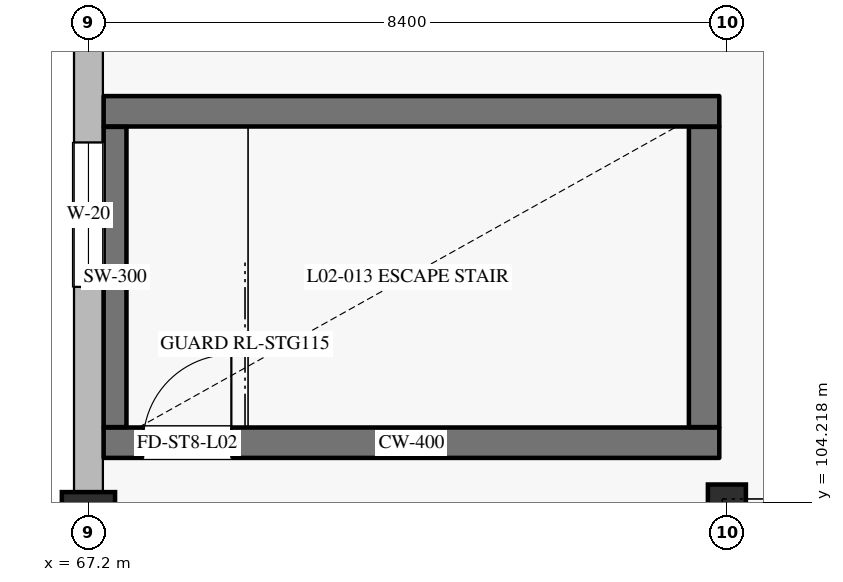
"""IFC4 building model, lengths in metres.
Left out: names, types, materials, properties, quantities, classifications, styles, units other than length and angle.
Written with IfcOpenShell. Run it as: python <this file> out.ifc"""

import sys

from ifc_helpers import new_model, si_unit, direction, frame, frame_2d, origin, origin_2d, place, context, subcontext, project, spatial, rectangle, hollow_rectangle, extrude, element, fill, save


model = new_model("IFC4")
c1 = context("Model", 3, precision=1e-05, world=origin(), true_north=direction((0.0, 1.0)))
c2 = subcontext(c1, "Body", "Model", "MODEL_VIEW")
j1 = project(units=[si_unit("LENGTHUNIT", "METRE"), si_unit("PLANEANGLEUNIT", "RADIAN")], contexts=[c1])
p1 = place(None, origin())
s1 = spatial("IfcSite", under=j1, at=p1, CompositionType="ELEMENT")
p2 = place(p1, origin())
s2 = spatial("IfcBuilding", under=s1, at=p2, CompositionType="ELEMENT")
p3 = place(p2, frame((0.0, 0.0, 11.4)))
s3 = spatial("IfcBuildingStorey", under=s2, at=p3, CompositionType="ELEMENT", Elevation=11.4)
p4 = place(p3, frame((67.2, 104.0, 0.0), z_axis=(0.0, 0.0, 1.0), x_axis=(1.0, 0.0, 0.0)))
e1 = element("IfcColumn", 1, at=p4, inside=s3, PredefinedType="COLUMN", context=c2, shape_type="SweptSolid", body=[
    extrude(rectangle(XDim=0.7, YDim=0.7, at=origin_2d()), origin(), (0.0, 0.0, 1.0), 4.8),
])
p5 = place(p3, frame((75.6, 104.0, 0.0), z_axis=(0.0, 0.0, 1.0), x_axis=(1.0, 0.0, 0.0)))
e2 = element("IfcColumn", 2, at=p5, inside=s3, PredefinedType="COLUMN", context=c2, shape_type="SweptSolid", body=[
    extrude(hollow_rectangle(XDim=0.5, YDim=0.9, WallThickness=0.024, at=origin_2d()), origin(), (0.0, 0.0, 1.0), 4.8),
])
p6 = place(p3, frame((67.2, 104.35, 0.0), z_axis=(0.0, 0.0, 1.0), x_axis=(0.0, 1.0, 0.0)))
e3 = element("IfcWall", 3, at=p6, inside=s3, PredefinedType="SOLIDWALL", context=c2, shape_type="SweptSolid", body=[
    extrude(rectangle(XDim=7.3, YDim=0.38, at=frame_2d((3.65, 0.0))), origin(), (0.0, 0.0, 1.0), 4.05),
])
p7 = place(p6, frame((2.7, 0.0, 1.05)))
e4 = element("IfcOpeningElement", 4, at=p7, cuts=e3, PredefinedType="OPENING", context=c2, shape_type="SweptSolid", body=[
    extrude(rectangle(XDim=1.9, YDim=1.4, at=frame_2d((0.95, 0.7))), frame((0.0, 0.2, 0.0), z_axis=(0.0, -1.0, 0.0), x_axis=(1.0, 0.0, 0.0)), (0.0, 0.0, 1.0), 0.4),
])
p8 = place(p3, frame((67.4, 105.0, 0.0), z_axis=(0.0, 0.0, 1.0), x_axis=(1.0, 0.0, 0.0)))
e5 = element("IfcWall", 5, at=p8, inside=s3, PredefinedType="SHEAR", context=c2, shape_type="SweptSolid", body=[
    extrude(rectangle(XDim=8.1, YDim=0.4, at=frame_2d((4.05, 0.0))), origin(), (0.0, 0.0, 1.0), 4.535),
])
p9 = place(p8, frame((0.52, 0.0, 0.0)))
e6 = element("IfcOpeningElement", 6, at=p9, cuts=e5, PredefinedType="OPENING", context=c2, shape_type="SweptSolid", body=[
    extrude(rectangle(XDim=1.16, YDim=2.2, at=frame_2d((0.58, 1.1))), frame((0.0, 0.21, 0.0), z_axis=(0.0, -1.0, 0.0), x_axis=(1.0, 0.0, 0.0)), (0.0, 0.0, 1.0), 0.42),
])
p10 = place(p3, frame((75.3, 105.205, 0.0), z_axis=(0.0, 0.0, 1.0), x_axis=(0.0, 1.0, 0.0)))
e7 = element("IfcWall", 7, at=p10, inside=s3, PredefinedType="SHEAR", context=c2, shape_type="SweptSolid", body=[
    extrude(rectangle(XDim=3.95, YDim=0.4, at=frame_2d((1.975, 0.0))), origin(), (0.0, 0.0, 1.0), 4.535),
])
p11 = place(p3, frame((67.4, 109.36, 0.0), z_axis=(0.0, 0.0, 1.0), x_axis=(1.0, 0.0, 0.0)))
e8 = element("IfcWall", 8, at=p11, inside=s3, PredefinedType="SHEAR", context=c2, shape_type="SweptSolid", body=[
    extrude(rectangle(XDim=8.1, YDim=0.4, at=frame_2d((4.05, 0.0))), origin(), (0.0, 0.0, 1.0), 4.535),
])
p12 = place(p3, frame((67.55, 105.205, 0.0), z_axis=(0.0, 0.0, 1.0), x_axis=(0.0, 1.0, 0.0)))
e9 = element("IfcWall", 9, at=p12, inside=s3, PredefinedType="SHEAR", context=c2, shape_type="SweptSolid", body=[
    extrude(rectangle(XDim=3.95, YDim=0.3, at=frame_2d((1.975, 0.0))), origin(), (0.0, 0.0, 1.0), 4.535),
])
p13 = place(p7, origin())
e10 = element("IfcWindow", 10, at=p13, inside=s3, PartitioningType="DOUBLE_PANEL_VERTICAL", PredefinedType="WINDOW", context=c2, shape_type="SweptSolid", body=[
    extrude(rectangle(XDim=1.9, YDim=1.4, at=frame_2d((0.95, 0.7))), frame((0.0, 0.03, 0.0), z_axis=(0.0, -1.0, 0.0), x_axis=(1.0, 0.0, 0.0)), (0.0, 0.0, 1.0), 0.06),
])
fill(e4, e10)
p14 = place(p9, origin())
e11 = element("IfcDoor", 11, at=p14, inside=s3, OperationType="SINGLE_SWING_RIGHT", PredefinedType="DOOR", context=c2, shape_type="SweptSolid", body=[
    extrude(rectangle(XDim=1.16, YDim=2.2, at=frame_2d((0.58, 1.1))), frame((0.0, 0.025, 0.0), z_axis=(0.0, -1.0, 0.0), x_axis=(1.0, 0.0, 0.0)), (0.0, 0.0, 1.0), 0.05),
])
fill(e6, e11)
save(model, sys.argv[1])
